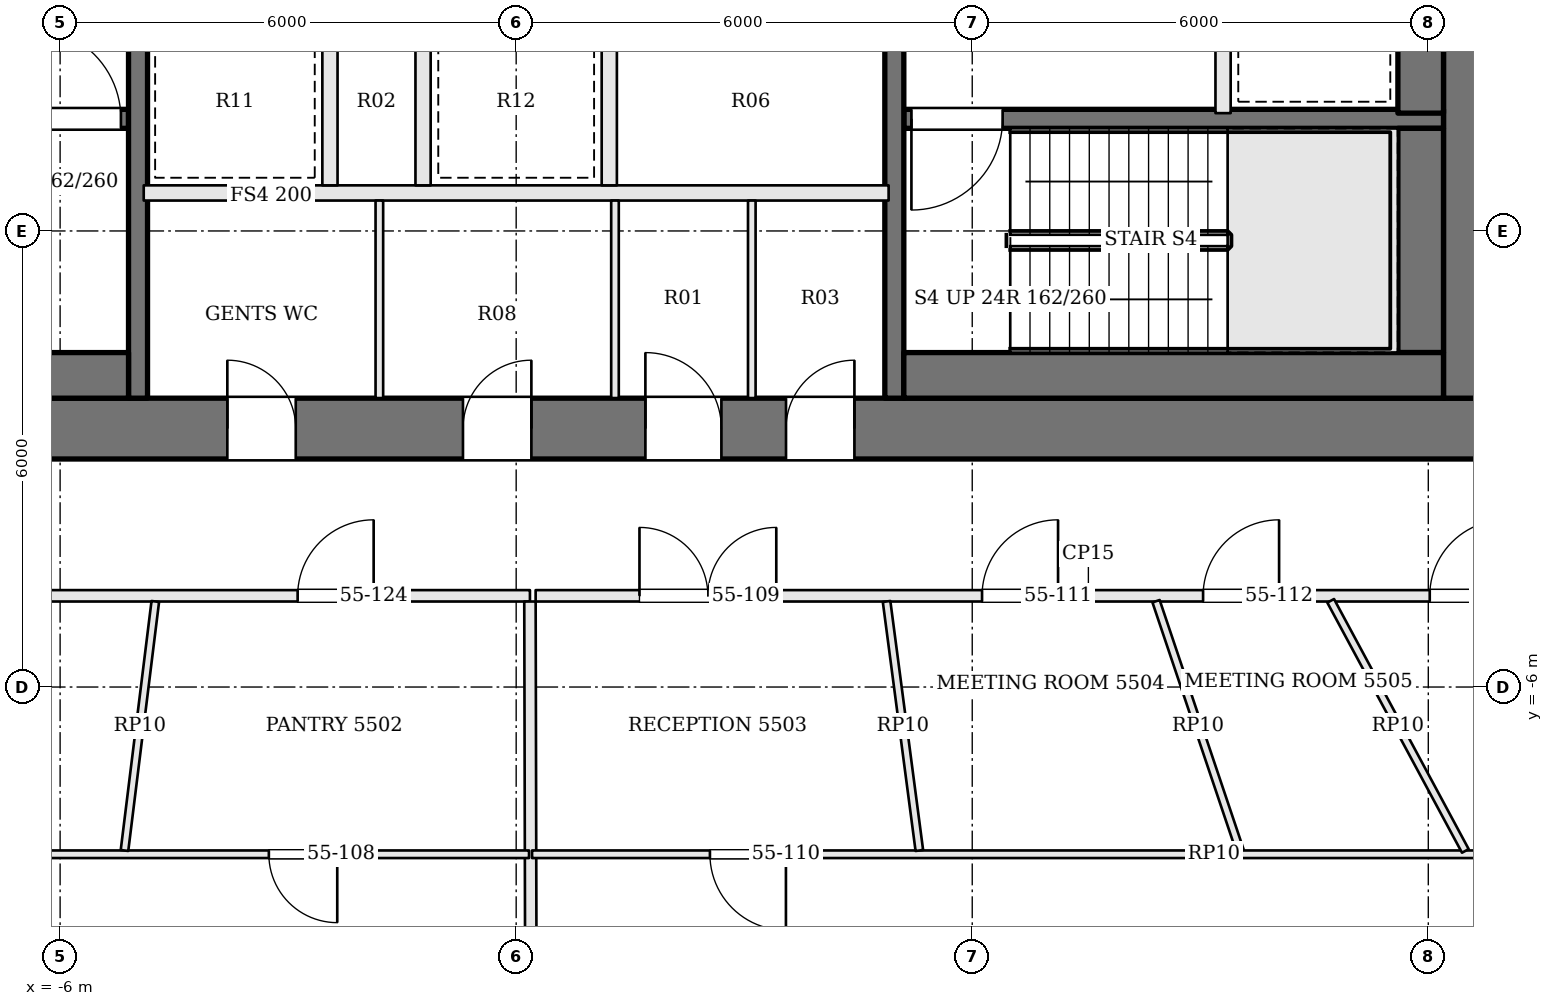
"""IFC4 building model, lengths in metres.
Left out: names, types, materials, properties, quantities, classifications, styles, units other than length and angle.
Written with IfcOpenShell. Run it as: python <this file> out.ifc"""

import sys

from ifc_helpers import new_model, si_unit, direction, frame, frame_2d, origin, place, context, subcontext, project, spatial, rectangle, extrude, element, fill, save


model = new_model("IFC4")
c1 = context("Model", 3, precision=1e-05, world=origin(), true_north=direction((0.0, 1.0)))
c2 = subcontext(c1, "Body", "Model", "MODEL_VIEW")
j1 = project(units=[si_unit("LENGTHUNIT", "METRE"), si_unit("PLANEANGLEUNIT", "RADIAN")], contexts=[c1])
p1 = place(None, origin())
s1 = spatial("IfcSite", under=j1, at=p1, CompositionType="ELEMENT")
p2 = place(p1, origin())
s2 = spatial("IfcBuilding", under=s1, at=p2, CompositionType="ELEMENT")
p3 = place(p2, frame((0.0, 0.0, 225.3)))
s3 = spatial("IfcBuildingStorey", under=s2, at=p3, CompositionType="ELEMENT", Elevation=225.3)
p4 = place(p3, frame((-13.0, -2.6, 0.0), z_axis=(0.0, 0.0, 1.0), x_axis=(1.0, 0.0, 0.0)))
e1 = element("IfcWall", 1, at=p4, inside=s3, PredefinedType="SHEAR", context=c2, shape_type="SweptSolid", body=[
    extrude(rectangle(XDim=26.0, YDim=0.8, at=frame_2d((13.0, 0.0))), origin(), (0.0, 0.0, 1.0), 3.9),
])
p5 = place(p4, frame((9.2, 0.0, 0.0)))
e2 = element("IfcOpeningElement", 2, at=p5, cuts=e1, PredefinedType="OPENING", context=c2, shape_type="SweptSolid", body=[
    extrude(rectangle(XDim=0.9, YDim=2.1, at=frame_2d((0.45, 1.05))), frame((0.0, 0.41, 0.0), z_axis=(0.0, -1.0, 0.0), x_axis=(1.0, 0.0, 0.0)), (0.0, 0.0, 1.0), 0.82),
])
p6 = place(p4, frame((12.3, 0.0, 0.0)))
e3 = element("IfcOpeningElement", 3, at=p6, cuts=e1, PredefinedType="OPENING", context=c2, shape_type="SweptSolid", body=[
    extrude(rectangle(XDim=0.9, YDim=2.1, at=frame_2d((0.45, 1.05))), frame((0.0, 0.41, 0.0), z_axis=(0.0, -1.0, 0.0), x_axis=(1.0, 0.0, 0.0)), (0.0, 0.0, 1.0), 0.82),
])
p7 = place(p4, frame((14.7, 0.0, 0.0)))
e4 = element("IfcOpeningElement", 4, at=p7, cuts=e1, PredefinedType="OPENING", context=c2, shape_type="SweptSolid", body=[
    extrude(rectangle(XDim=1.0, YDim=2.1, at=frame_2d((0.5, 1.05))), frame((0.0, 0.41, 0.0), z_axis=(0.0, -1.0, 0.0), x_axis=(1.0, 0.0, 0.0)), (0.0, 0.0, 1.0), 0.82),
])
p8 = place(p4, frame((16.55, 0.0, 0.0)))
e5 = element("IfcOpeningElement", 5, at=p8, cuts=e1, PredefinedType="OPENING", context=c2, shape_type="SweptSolid", body=[
    extrude(rectangle(XDim=0.9, YDim=2.1, at=frame_2d((0.45, 1.05))), frame((0.0, 0.41, 0.0), z_axis=(0.0, -1.0, 0.0), x_axis=(1.0, 0.0, 0.0)), (0.0, 0.0, 1.0), 0.82),
])
p9 = place(p3, frame((12.6, -2.2, 0.0), z_axis=(0.0, 0.0, 1.0), x_axis=(0.0, 1.0, 0.0)))
e6 = element("IfcWall", 6, at=p9, inside=s3, PredefinedType="SHEAR", context=c2, shape_type="SweptSolid", body=[
    extrude(rectangle(XDim=13.4, YDim=0.8, at=frame_2d((6.7, 0.0))), origin(), (0.0, 0.0, 1.0), 3.9),
])
p10 = place(p9, frame((7.4, 0.0, 0.0)))
e7 = element("IfcOpeningElement", 7, at=p10, cuts=e6, PredefinedType="OPENING", context=c2, shape_type="SweptSolid", body=[
    extrude(rectangle(XDim=1.8, YDim=2.1, at=frame_2d((0.9, 1.05))), frame((0.0, 0.41, 0.0), z_axis=(0.0, -1.0, 0.0), x_axis=(1.0, 0.0, 0.0)), (0.0, 0.0, 1.0), 0.82),
])
p11 = place(p3, frame((-12.2, 1.475, 0.0), z_axis=(0.0, 0.0, 1.0), x_axis=(1.0, 0.0, 0.0)))
e8 = element("IfcWall", 8, at=p11, inside=s3, PredefinedType="SOLIDWALL", context=c2, shape_type="SweptSolid", body=[
    extrude(rectangle(XDim=7.1, YDim=0.25, at=frame_2d((3.55, 0.0))), origin(), (0.0, 0.0, 1.0), 3.7),
])
p12 = place(p11, frame((5.8, 0.0, 0.0)))
e9 = element("IfcOpeningElement", 9, at=p12, cuts=e8, PredefinedType="OPENING", context=c2, shape_type="SweptSolid", body=[
    extrude(rectangle(XDim=1.2, YDim=2.1, at=frame_2d((0.6, 1.05))), frame((0.0, 0.135, 0.0), z_axis=(0.0, -1.0, 0.0), x_axis=(1.0, 0.0, 0.0)), (0.0, 0.0, 1.0), 0.27),
])
p13 = place(p3, frame((12.2, 1.475, 0.0), z_axis=(0.0, 0.0, 1.0), x_axis=(-1.0, 0.0, 0.0)))
e10 = element("IfcWall", 10, at=p13, inside=s3, PredefinedType="SOLIDWALL", context=c2, shape_type="SweptSolid", body=[
    extrude(rectangle(XDim=7.1, YDim=0.25, at=frame_2d((3.55, 0.0))), origin(), (0.0, 0.0, 1.0), 3.7),
])
p14 = place(p13, frame((5.8, 0.0, 0.0)))
e11 = element("IfcOpeningElement", 11, at=p14, cuts=e10, PredefinedType="OPENING", context=c2, shape_type="SweptSolid", body=[
    extrude(rectangle(XDim=1.2, YDim=2.1, at=frame_2d((0.6, 1.05))), frame((0.0, 0.135, 0.0), z_axis=(0.0, -1.0, 0.0), x_axis=(1.0, 0.0, 0.0)), (0.0, 0.0, 1.0), 0.27),
])
p15 = place(p3, frame((9.3, 4.55, 0.0), z_axis=(0.0, 0.0, 1.0), x_axis=(0.0, -1.0, 0.0)))
e12 = element("IfcWall", 12, at=p15, inside=s3, PredefinedType="SOLIDWALL", context=c2, shape_type="SweptSolid", body=[
    extrude(rectangle(XDim=3.0, YDim=0.2, at=frame_2d((1.5, 0.0))), origin(), (0.0, 0.0, 1.0), 3.7),
])
p16 = place(p3, frame((-4.975, -2.2, 0.0), z_axis=(0.0, 0.0, 1.0), x_axis=(0.0, 1.0, 0.0)))
e13 = element("IfcWall", 13, at=p16, inside=s3, PredefinedType="SOLIDWALL", context=c2, shape_type="SweptSolid", body=[
    extrude(rectangle(XDim=13.4, YDim=0.25, at=frame_2d((6.7, 0.0))), origin(), (0.0, 0.0, 1.0), 3.7),
])
p17 = place(p16, frame((5.25, 0.0, 0.0)))
e14 = element("IfcOpeningElement", 14, at=p17, cuts=e13, PredefinedType="OPENING", context=c2, shape_type="SweptSolid", body=[
    extrude(rectangle(XDim=1.2, YDim=2.1, at=frame_2d((0.6, 1.05))), frame((0.0, 0.135, 0.0), z_axis=(0.0, -1.0, 0.0), x_axis=(1.0, 0.0, 0.0)), (0.0, 0.0, 1.0), 0.27),
])
p18 = place(p3, frame((4.975, 11.2, 0.0), z_axis=(0.0, 0.0, 1.0), x_axis=(0.0, -1.0, 0.0)))
e15 = element("IfcWall", 15, at=p18, inside=s3, PredefinedType="SOLIDWALL", context=c2, shape_type="SweptSolid", body=[
    extrude(rectangle(XDim=13.4, YDim=0.25, at=frame_2d((6.7, 0.0))), origin(), (0.0, 0.0, 1.0), 3.7),
])
p19 = place(p18, frame((5.25, 0.0, 0.0)))
e16 = element("IfcOpeningElement", 16, at=p19, cuts=e15, PredefinedType="OPENING", context=c2, shape_type="SweptSolid", body=[
    extrude(rectangle(XDim=1.2, YDim=2.1, at=frame_2d((0.6, 1.05))), frame((0.0, 0.135, 0.0), z_axis=(0.0, -1.0, 0.0), x_axis=(1.0, 0.0, 0.0)), (0.0, 0.0, 1.0), 0.27),
])
p20 = place(p3, frame((-12.2, -1.9, 0.0), z_axis=(0.0, 0.0, 1.0), x_axis=(1.0, 0.0, 0.0)))
e17 = element("IfcWall", 17, at=p20, inside=s3, PredefinedType="SOLIDWALL", context=c2, shape_type="SweptSolid", body=[
    extrude(rectangle(XDim=7.1, YDim=0.6, at=frame_2d((3.55, 0.0))), origin(), (0.0, 0.0, 1.0), 3.7),
])
p21 = place(p3, frame((11.9, 4.55, 0.0), z_axis=(0.0, 0.0, 1.0), x_axis=(0.0, -1.0, 0.0)))
e18 = element("IfcWall", 18, at=p21, inside=s3, PredefinedType="SOLIDWALL", context=c2, shape_type="SweptSolid", body=[
    extrude(rectangle(XDim=3.0, YDim=0.6, at=frame_2d((1.5, 0.0))), origin(), (0.0, 0.0, 1.0), 3.7),
])
p22 = place(p3, frame((11.9, 1.35, 0.0), z_axis=(0.0, 0.0, 1.0), x_axis=(0.0, -1.0, 0.0)))
e19 = element("IfcWall", 19, at=p22, inside=s3, PredefinedType="SOLIDWALL", context=c2, shape_type="SweptSolid", body=[
    extrude(rectangle(XDim=2.95, YDim=0.6, at=frame_2d((1.475, 0.0))), origin(), (0.0, 0.0, 1.0), 3.7),
])
p23 = place(p3, frame((12.2, -1.9, 0.0), z_axis=(0.0, 0.0, 1.0), x_axis=(-1.0, 0.0, 0.0)))
e20 = element("IfcWall", 20, at=p23, inside=s3, PredefinedType="SOLIDWALL", context=c2, shape_type="SweptSolid", body=[
    extrude(rectangle(XDim=7.1, YDim=0.6, at=frame_2d((3.55, 0.0))), origin(), (0.0, 0.0, 1.0), 3.7),
])
p24 = place(p3, frame((-4.9, 0.5, 0.0), z_axis=(0.0, 0.0, 1.0), x_axis=(1.0, 0.0, 0.0)))
e21 = element("IfcWall", 21, at=p24, inside=s3, PredefinedType="SOLIDWALL", context=c2, shape_type="SweptSolid", body=[
    extrude(rectangle(XDim=9.8, YDim=0.2, at=frame_2d((4.9, 0.0))), origin(), (0.0, 0.0, 1.0), 3.7),
])
for number, where, z_axis, x_axis in (
    (22, (-2.45, 0.6, 0.0), (0.0, 0.0, 1.0), (0.0, 1.0, 0.0)),
    (23, (-1.225, 0.6, 0.0), (0.0, 0.0, 1.0), (0.0, 1.0, 0.0)),
    (24, (1.225, 0.6, 0.0), (0.0, 0.0, 1.0), (0.0, 1.0, 0.0)),
):
    element("IfcWall", number, at=place(p3, frame(where, z_axis=z_axis, x_axis=x_axis)), inside=s3, PredefinedType="SOLIDWALL", context=c2, shape_type="SweptSolid", body=[
        extrude(rectangle(XDim=2.2, YDim=0.2, at=frame_2d((1.1, 0.0))), origin(), (0.0, 0.0, 1.0), 3.7),
    ])
for number, where, z_axis, x_axis in (
    (25, (-1.8, -2.2, 0.0), (0.0, 0.0, 1.0), (0.0, 1.0, 0.0)),
    (26, (1.3, -2.2, 0.0), (0.0, 0.0, 1.0), (0.0, 1.0, 0.0)),
    (27, (3.1, -2.2, 0.0), (0.0, 0.0, 1.0), (0.0, 1.0, 0.0)),
):
    element("IfcWall", number, at=place(p3, frame(where, z_axis=z_axis, x_axis=x_axis)), inside=s3, PredefinedType="PARTITIONING", context=c2, shape_type="SweptSolid", body=[
        extrude(rectangle(XDim=2.6, YDim=0.1, at=frame_2d((1.3, 0.0))), origin(), (0.0, 0.0, 1.0), 3.7),
    ])
p25 = place(p3, frame((-14.725, -4.8, 0.0), z_axis=(0.0, 0.0, 1.0), x_axis=(1.0, 0.0, 0.0)))
e28 = element("IfcWall", 28, at=p25, inside=s3, PredefinedType="PARTITIONING", context=c2, shape_type="SweptSolid", body=[
    extrude(rectangle(XDim=14.906, YDim=0.15, at=frame_2d((7.453, 0.0))), origin(), (0.0, 0.0, 1.0), 3.084),
])
p26 = place(p25, frame((0.45, 0.0, 0.0)))
e29 = element("IfcOpeningElement", 29, at=p26, cuts=e28, PredefinedType="OPENING", context=c2, shape_type="SweptSolid", body=[
    extrude(rectangle(XDim=1.8, YDim=2.1, at=frame_2d((0.9, 1.05))), frame((0.0, 0.085, 0.0), z_axis=(0.0, -1.0, 0.0), x_axis=(1.0, 0.0, 0.0)), (0.0, 0.0, 1.0), 0.17),
])
p27 = place(p25, frame((6.514, 0.0, 0.0)))
e30 = element("IfcOpeningElement", 30, at=p27, cuts=e28, PredefinedType="OPENING", context=c2, shape_type="SweptSolid", body=[
    extrude(rectangle(XDim=1.0, YDim=2.4, at=frame_2d((0.5, 1.2))), frame((0.0, 0.085, 0.0), z_axis=(0.0, -1.0, 0.0), x_axis=(1.0, 0.0, 0.0)), (0.0, 0.0, 1.0), 0.17),
])
p28 = place(p25, frame((11.85, 0.0, 0.0)))
e31 = element("IfcOpeningElement", 31, at=p28, cuts=e28, PredefinedType="OPENING", context=c2, shape_type="SweptSolid", body=[
    extrude(rectangle(XDim=1.0, YDim=2.1, at=frame_2d((0.5, 1.05))), frame((0.0, 0.085, 0.0), z_axis=(0.0, -1.0, 0.0), x_axis=(1.0, 0.0, 0.0)), (0.0, 0.0, 1.0), 0.17),
])
p29 = place(p3, frame((0.219, -21.059, 0.0), z_axis=(0.0, 0.0, 1.0), x_axis=(-0.002338169228, 0.999997266479, 0.0)))
e32 = element("IfcWall", 32, at=p29, inside=s3, PredefinedType="PARTITIONING", context=c2, shape_type="SweptSolid", body=[
    extrude(rectangle(XDim=16.184, YDim=0.15, at=frame_2d((8.092, 0.0))), origin(), (0.0, 0.0, 1.0), 3.184),
])
p30 = place(p3, frame((0.256, -4.8, 0.0), z_axis=(0.0, 0.0, 1.0), x_axis=(1.0, 0.0, 0.0)))
e33 = element("IfcWall", 33, at=p30, inside=s3, PredefinedType="PARTITIONING", context=c2, shape_type="SweptSolid", body=[
    extrude(rectangle(XDim=14.544, YDim=0.15, at=frame_2d((7.272, 0.0))), origin(), (0.0, 0.0, 1.0), 3.084),
])
p31 = place(p30, frame((1.366, 0.0, 0.0)))
e34 = element("IfcOpeningElement", 34, at=p31, cuts=e33, PredefinedType="OPENING", context=c2, shape_type="SweptSolid", body=[
    extrude(rectangle(XDim=1.8, YDim=2.1, at=frame_2d((0.9, 1.05))), frame((0.0, 0.085, 0.0), z_axis=(0.0, -1.0, 0.0), x_axis=(1.0, 0.0, 0.0)), (0.0, 0.0, 1.0), 0.17),
])
p32 = place(p30, frame((5.873, 0.0, 0.0)))
e35 = element("IfcOpeningElement", 35, at=p32, cuts=e33, PredefinedType="OPENING", context=c2, shape_type="SweptSolid", body=[
    extrude(rectangle(XDim=1.0, YDim=2.4, at=frame_2d((0.5, 1.2))), frame((0.0, 0.085, 0.0), z_axis=(0.0, -1.0, 0.0), x_axis=(1.0, 0.0, 0.0)), (0.0, 0.0, 1.0), 0.17),
])
p33 = place(p30, frame((8.781, 0.0, 0.0)))
e36 = element("IfcOpeningElement", 36, at=p33, cuts=e33, PredefinedType="OPENING", context=c2, shape_type="SweptSolid", body=[
    extrude(rectangle(XDim=1.0, YDim=2.4, at=frame_2d((0.5, 1.2))), frame((0.0, 0.085, 0.0), z_axis=(0.0, -1.0, 0.0), x_axis=(1.0, 0.0, 0.0)), (0.0, 0.0, 1.0), 0.17),
])
p34 = place(p30, frame((11.763, 0.0, 0.0)))
e37 = element("IfcOpeningElement", 37, at=p34, cuts=e33, PredefinedType="OPENING", context=c2, shape_type="SweptSolid", body=[
    extrude(rectangle(XDim=1.0, YDim=2.4, at=frame_2d((0.5, 1.2))), frame((0.0, 0.085, 0.0), z_axis=(0.0, -1.0, 0.0), x_axis=(1.0, 0.0, 0.0)), (0.0, 0.0, 1.0), 0.17),
])
p35 = place(p3, frame((0.169, -8.2, 0.0), z_axis=(0.0, 0.0, 1.0), x_axis=(-1.0, 0.0, 0.0)))
e38 = element("IfcWall", 38, at=p35, inside=s3, PredefinedType="PARTITIONING", context=c2, shape_type="SweptSolid", body=[
    extrude(rectangle(XDim=18.319, YDim=0.1, at=frame_2d((9.16, 0.0))), origin(), (0.0, 0.0, 1.0), 3.084),
])
p36 = place(p35, frame((2.523, 0.0, 0.0)))
e39 = element("IfcOpeningElement", 39, at=p36, cuts=e38, PredefinedType="OPENING", context=c2, shape_type="SweptSolid", body=[
    extrude(rectangle(XDim=0.9, YDim=2.1, at=frame_2d((0.45, 1.05))), frame((0.0, 0.06, 0.0), z_axis=(0.0, -1.0, 0.0), x_axis=(1.0, 0.0, 0.0)), (0.0, 0.0, 1.0), 0.12),
])
p37 = place(p35, frame((7.75, 0.0, 0.0)))
e40 = element("IfcOpeningElement", 40, at=p37, cuts=e38, PredefinedType="OPENING", context=c2, shape_type="SweptSolid", body=[
    extrude(rectangle(XDim=1.0, YDim=2.4, at=frame_2d((0.5, 1.2))), frame((0.0, 0.06, 0.0), z_axis=(0.0, -1.0, 0.0), x_axis=(1.0, 0.0, 0.0)), (0.0, 0.0, 1.0), 0.12),
])
p38 = place(p3, frame((-4.748, -4.875, 0.0), z_axis=(0.0, 0.0, 1.0), x_axis=(-0.122778403884, -0.992434110427, 0.0)))
e41 = element("IfcWall", 41, at=p38, inside=s3, PredefinedType="PARTITIONING", context=c2, shape_type="SweptSolid", body=[
    extrude(rectangle(XDim=3.301, YDim=0.1, at=frame_2d((1.65, 0.0))), origin(), (0.0, 0.0, 1.0), 3.084),
])
p39 = place(p3, frame((18.15, -8.2, 0.0), z_axis=(0.0, 0.0, 1.0), x_axis=(-1.0, 0.0, 0.0)))
e42 = element("IfcWall", 42, at=p39, inside=s3, PredefinedType="PARTITIONING", context=c2, shape_type="SweptSolid", body=[
    extrude(rectangle(XDim=17.941, YDim=0.1, at=frame_2d((8.97, 0.0))), origin(), (0.0, 0.0, 1.0), 3.084),
])
p40 = place(p39, frame((14.601, 0.0, 0.0)))
e43 = element("IfcOpeningElement", 43, at=p40, cuts=e42, PredefinedType="OPENING", context=c2, shape_type="SweptSolid", body=[
    extrude(rectangle(XDim=1.0, YDim=2.1, at=frame_2d((0.5, 1.05))), frame((0.0, 0.06, 0.0), z_axis=(0.0, -1.0, 0.0), x_axis=(1.0, 0.0, 0.0)), (0.0, 0.0, 1.0), 0.12),
])
p41 = place(p3, frame((4.873, -4.875, 0.0), z_axis=(0.0, 0.0, 1.0), x_axis=(0.13048891715, -0.991449768017, 0.0)))
e44 = element("IfcWall", 44, at=p41, inside=s3, PredefinedType="PARTITIONING", context=c2, shape_type="SweptSolid", body=[
    extrude(rectangle(XDim=3.304, YDim=0.1, at=frame_2d((1.652, 0.0))), origin(), (0.0, 0.0, 1.0), 3.084),
])
p42 = place(p3, frame((8.418, -4.871, 0.0), z_axis=(0.0, 0.0, 1.0), x_axis=(0.319060884331, -0.947734220175, 0.0)))
e45 = element("IfcWall", 45, at=p42, inside=s3, PredefinedType="PARTITIONING", context=c2, shape_type="SweptSolid", body=[
    extrude(rectangle(XDim=3.462, YDim=0.1, at=frame_2d((1.731, 0.0))), origin(), (0.0, 0.0, 1.0), 3.084),
])
p43 = place(p3, frame((10.716, -4.866, 0.0), z_axis=(0.0, 0.0, 1.0), x_axis=(0.474084238022, -0.880479491674, 0.0)))
e46 = element("IfcWall", 46, at=p43, inside=s3, PredefinedType="PARTITIONING", context=c2, shape_type="SweptSolid", body=[
    extrude(rectangle(XDim=3.737, YDim=0.1, at=frame_2d((1.868, 0.0))), origin(), (0.0, 0.0, 1.0), 3.084),
])
p44 = place(p12, origin())
e47 = element("IfcDoor", 47, at=p44, inside=s3, OperationType="SINGLE_SWING_LEFT", PredefinedType="DOOR", context=c2, shape_type="SweptSolid", body=[
    extrude(rectangle(XDim=1.2, YDim=2.1, at=frame_2d((0.6, 1.05))), frame((0.0, 0.025, 0.0), z_axis=(0.0, -1.0, 0.0), x_axis=(1.0, 0.0, 0.0)), (0.0, 0.0, 1.0), 0.05),
])
fill(e9, e47)
p45 = place(p14, origin())
e48 = element("IfcDoor", 48, at=p45, inside=s3, OperationType="SINGLE_SWING_RIGHT", PredefinedType="DOOR", context=c2, shape_type="SweptSolid", body=[
    extrude(rectangle(XDim=1.2, YDim=2.1, at=frame_2d((0.6, 1.05))), frame((0.0, 0.025, 0.0), z_axis=(0.0, -1.0, 0.0), x_axis=(1.0, 0.0, 0.0)), (0.0, 0.0, 1.0), 0.05),
])
fill(e11, e48)
p46 = place(p5, origin())
e49 = element("IfcDoor", 49, at=p46, inside=s3, OperationType="SINGLE_SWING_LEFT", PredefinedType="DOOR", context=c2, shape_type="SweptSolid", body=[
    extrude(rectangle(XDim=0.9, YDim=2.1, at=frame_2d((0.45, 1.05))), frame((0.0, 0.025, 0.0), z_axis=(0.0, -1.0, 0.0), x_axis=(1.0, 0.0, 0.0)), (0.0, 0.0, 1.0), 0.05),
])
fill(e2, e49)
p47 = place(p6, origin())
e50 = element("IfcDoor", 50, at=p47, inside=s3, OperationType="SINGLE_SWING_RIGHT", PredefinedType="DOOR", context=c2, shape_type="SweptSolid", body=[
    extrude(rectangle(XDim=0.9, YDim=2.1, at=frame_2d((0.45, 1.05))), frame((0.0, 0.025, 0.0), z_axis=(0.0, -1.0, 0.0), x_axis=(1.0, 0.0, 0.0)), (0.0, 0.0, 1.0), 0.05),
])
fill(e3, e50)
p48 = place(p7, origin())
e51 = element("IfcDoor", 51, at=p48, inside=s3, OperationType="SINGLE_SWING_LEFT", PredefinedType="DOOR", context=c2, shape_type="SweptSolid", body=[
    extrude(rectangle(XDim=1.0, YDim=2.1, at=frame_2d((0.5, 1.05))), frame((0.0, 0.025, 0.0), z_axis=(0.0, -1.0, 0.0), x_axis=(1.0, 0.0, 0.0)), (0.0, 0.0, 1.0), 0.05),
])
fill(e4, e51)
p49 = place(p8, origin())
e52 = element("IfcDoor", 52, at=p49, inside=s3, OperationType="SINGLE_SWING_RIGHT", PredefinedType="DOOR", context=c2, shape_type="SweptSolid", body=[
    extrude(rectangle(XDim=0.9, YDim=2.1, at=frame_2d((0.45, 1.05))), frame((0.0, 0.025, 0.0), z_axis=(0.0, -1.0, 0.0), x_axis=(1.0, 0.0, 0.0)), (0.0, 0.0, 1.0), 0.05),
])
fill(e5, e52)
p50 = place(p36, origin())
e53 = element("IfcDoor", 53, at=p50, inside=s3, OperationType="SINGLE_SWING_LEFT", PredefinedType="DOOR", context=c2, shape_type="SweptSolid", body=[
    extrude(rectangle(XDim=0.9, YDim=2.1, at=frame_2d((0.45, 1.05))), frame((0.0, 0.025, 0.0), z_axis=(0.0, -1.0, 0.0), x_axis=(1.0, 0.0, 0.0)), (0.0, 0.0, 1.0), 0.05),
])
fill(e39, e53)
p51 = place(p31, origin())
e54 = element("IfcDoor", 54, at=p51, inside=s3, OperationType="DOUBLE_DOOR_SINGLE_SWING", PredefinedType="DOOR", context=c2, shape_type="SweptSolid", body=[
    extrude(rectangle(XDim=1.8, YDim=2.1, at=frame_2d((0.9, 1.05))), frame((0.0, 0.025, 0.0), z_axis=(0.0, -1.0, 0.0), x_axis=(1.0, 0.0, 0.0)), (0.0, 0.0, 1.0), 0.05),
])
fill(e34, e54)
p52 = place(p40, origin())
e55 = element("IfcDoor", 55, at=p52, inside=s3, OperationType="SINGLE_SWING_LEFT", PredefinedType="DOOR", context=c2, shape_type="SweptSolid", body=[
    extrude(rectangle(XDim=1.0, YDim=2.1, at=frame_2d((0.5, 1.05))), frame((0.0, 0.025, 0.0), z_axis=(0.0, -1.0, 0.0), x_axis=(1.0, 0.0, 0.0)), (0.0, 0.0, 1.0), 0.05),
])
fill(e43, e55)
p53 = place(p32, origin())
e56 = element("IfcDoor", 56, at=p53, inside=s3, OperationType="SINGLE_SWING_RIGHT", PredefinedType="DOOR", context=c2, shape_type="SweptSolid", body=[
    extrude(rectangle(XDim=1.0, YDim=2.4, at=frame_2d((0.5, 1.2))), frame((0.0, 0.025, 0.0), z_axis=(0.0, -1.0, 0.0), x_axis=(1.0, 0.0, 0.0)), (0.0, 0.0, 1.0), 0.05),
])
fill(e35, e56)
p54 = place(p33, origin())
e57 = element("IfcDoor", 57, at=p54, inside=s3, OperationType="SINGLE_SWING_RIGHT", PredefinedType="DOOR", context=c2, shape_type="SweptSolid", body=[
    extrude(rectangle(XDim=1.0, YDim=2.4, at=frame_2d((0.5, 1.2))), frame((0.0, 0.025, 0.0), z_axis=(0.0, -1.0, 0.0), x_axis=(1.0, 0.0, 0.0)), (0.0, 0.0, 1.0), 0.05),
])
fill(e36, e57)
p55 = place(p34, origin())
e58 = element("IfcDoor", 58, at=p55, inside=s3, OperationType="SINGLE_SWING_RIGHT", PredefinedType="DOOR", context=c2, shape_type="SweptSolid", body=[
    extrude(rectangle(XDim=1.0, YDim=2.4, at=frame_2d((0.5, 1.2))), frame((0.0, 0.025, 0.0), z_axis=(0.0, -1.0, 0.0), x_axis=(1.0, 0.0, 0.0)), (0.0, 0.0, 1.0), 0.05),
])
fill(e37, e58)
p56 = place(p28, origin())
e59 = element("IfcDoor", 59, at=p56, inside=s3, OperationType="SINGLE_SWING_RIGHT", PredefinedType="DOOR", context=c2, shape_type="SweptSolid", body=[
    extrude(rectangle(XDim=1.0, YDim=2.1, at=frame_2d((0.5, 1.05))), frame((0.0, 0.025, 0.0), z_axis=(0.0, -1.0, 0.0), x_axis=(1.0, 0.0, 0.0)), (0.0, 0.0, 1.0), 0.05),
])
fill(e31, e59)
save(model, sys.argv[1])
